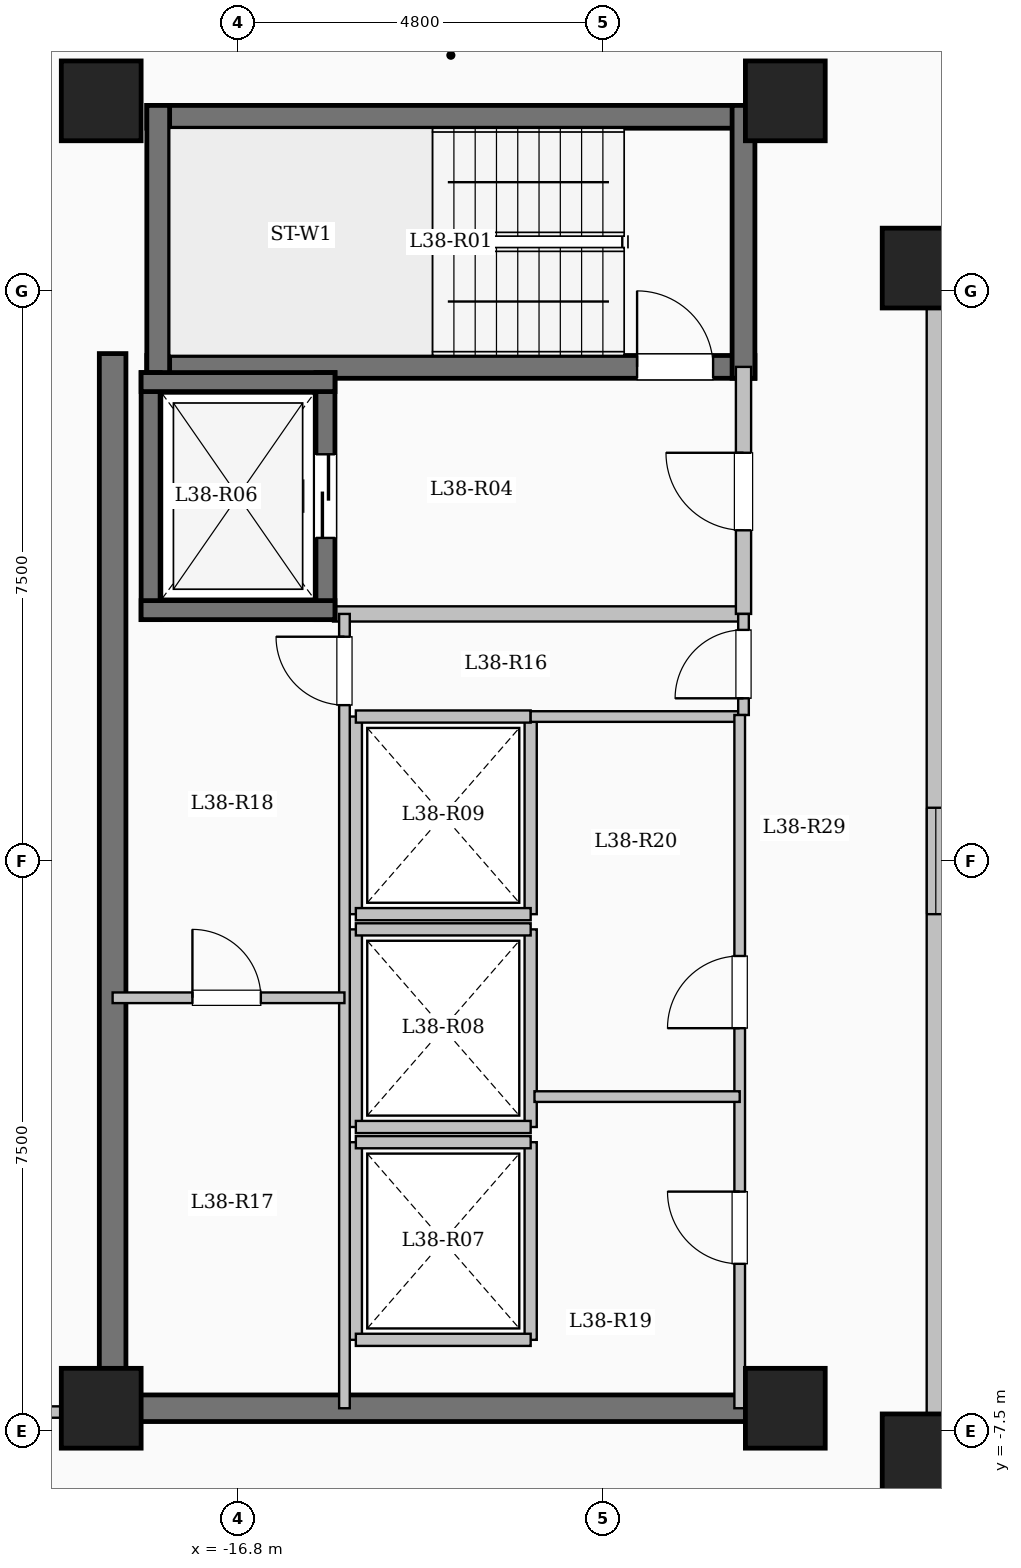
"""IFC4 building model, lengths in metres.
Left out: names, types, materials, properties, quantities, classifications, styles, units other than length and angle.
Written with IfcOpenShell. Run it as: python <this file> out.ifc"""

import sys

from ifc_helpers import new_model, si_unit, direction, frame, frame_2d, origin, origin_2d, place, context, subcontext, project, spatial, rectangle, extrude, element, fill, save


model = new_model("IFC4")
c1 = context("Model", 3, precision=1e-05, world=origin(), true_north=direction((0.0, 1.0)))
c2 = subcontext(c1, "Body", "Model", "MODEL_VIEW")
j1 = project(units=[si_unit("LENGTHUNIT", "METRE"), si_unit("PLANEANGLEUNIT", "RADIAN")], contexts=[c1])
p1 = place(None, origin())
s1 = spatial("IfcSite", under=j1, at=p1, CompositionType="ELEMENT")
p2 = place(p1, origin())
s2 = spatial("IfcBuilding", under=s1, at=p2, CompositionType="ELEMENT")
p3 = place(p2, frame((0.0, 0.0, 142.65)))
s3 = spatial("IfcBuildingStorey", under=s2, at=p3, CompositionType="ELEMENT", Elevation=142.65)
for number, where, z_axis, x_axis in (
    (1, (-7.8, -7.8, 0.0), (0.0, 0.0, 1.0), (1.0, 0.0, 0.0)),
    (2, (-7.8, 7.8, 0.0), (0.0, 0.0, 1.0), (1.0, 0.0, 0.0)),
    (3, (-9.6, -7.2, 0.0), (0.0, 0.0, 1.0), (1.0, 0.0, 0.0)),
    (4, (-9.6, 10.0, 0.0), (0.0, 0.0, 1.0), (1.0, 0.0, 0.0)),
    (5, (-18.6, -7.2, 0.0), (0.0, 0.0, 1.0), (1.0, 0.0, 0.0)),
    (6, (-18.6, 10.0, 0.0), (0.0, 0.0, 1.0), (1.0, 0.0, 0.0)),
):
    element("IfcColumn", number, at=place(p3, frame(where, z_axis=z_axis, x_axis=x_axis)), inside=s3, PredefinedType="COLUMN", context=c2, shape_type="SweptSolid", body=[
        extrude(rectangle(XDim=1.05, YDim=1.05, at=origin_2d()), origin(), (0.0, 0.0, 1.0), 3.35),
    ])
p4 = place(p3, frame((-7.62, -7.62, 0.0), z_axis=(0.0, 0.0, 1.0), x_axis=(1.0, 0.0, 0.0)))
e7 = element("IfcWall", 7, at=p4, inside=s3, PredefinedType="SOLIDWALL", context=c2, shape_type="SweptSolid", body=[
    extrude(rectangle(XDim=15.24, YDim=0.24, at=frame_2d((7.62, 0.0))), origin(), (0.0, 0.0, 1.0), 3.1),
])
p5 = place(p4, frame((6.92, 0.0, 0.95)))
e8 = element("IfcOpeningElement", 8, at=p5, cuts=e7, PredefinedType="OPENING", context=c2, shape_type="SweptSolid", body=[
    extrude(rectangle(XDim=1.4, YDim=1.5, at=frame_2d((0.7, 0.75))), frame((0.0, 0.13, 0.0), z_axis=(0.0, -1.0, 0.0), x_axis=(1.0, 0.0, 0.0)), (0.0, 0.0, 1.0), 0.26),
])
p6 = place(p3, frame((7.62, 7.62, 0.0), z_axis=(0.0, 0.0, 1.0), x_axis=(-1.0, 0.0, 0.0)))
e9 = element("IfcWall", 9, at=p6, inside=s3, PredefinedType="SOLIDWALL", context=c2, shape_type="SweptSolid", body=[
    extrude(rectangle(XDim=15.24, YDim=0.24, at=frame_2d((7.62, 0.0))), origin(), (0.0, 0.0, 1.0), 3.1),
])
p7 = place(p6, frame((6.92, 0.0, 0.95)))
e10 = element("IfcOpeningElement", 10, at=p7, cuts=e9, PredefinedType="OPENING", context=c2, shape_type="SweptSolid", body=[
    extrude(rectangle(XDim=1.4, YDim=1.5, at=frame_2d((0.7, 0.75))), frame((0.0, 0.13, 0.0), z_axis=(0.0, -1.0, 0.0), x_axis=(1.0, 0.0, 0.0)), (0.0, 0.0, 1.0), 0.26),
])
p8 = place(p3, frame((-7.62, 7.62, 0.0), z_axis=(0.0, 0.0, 1.0), x_axis=(0.0, -1.0, 0.0)))
e11 = element("IfcWall", 11, at=p8, inside=s3, PredefinedType="SOLIDWALL", context=c2, shape_type="SweptSolid", body=[
    extrude(rectangle(XDim=15.24, YDim=0.24, at=frame_2d((7.62, 0.0))), origin(), (0.0, 0.0, 1.0), 3.1),
])
p9 = place(p8, frame((6.92, 0.0, 0.95)))
e12 = element("IfcOpeningElement", 12, at=p9, cuts=e11, PredefinedType="OPENING", context=c2, shape_type="SweptSolid", body=[
    extrude(rectangle(XDim=1.4, YDim=1.5, at=frame_2d((0.7, 0.75))), frame((0.0, 0.13, 0.0), z_axis=(0.0, -1.0, 0.0), x_axis=(1.0, 0.0, 0.0)), (0.0, 0.0, 1.0), 0.26),
])
p10 = place(p3, frame((-18.0, 9.79, 0.0), z_axis=(0.0, 0.0, 1.0), x_axis=(1.0, 0.0, 0.0)))
e13 = element("IfcWall", 13, at=p10, inside=s3, PredefinedType="SHEAR", context=c2, shape_type="SweptSolid", body=[
    extrude(rectangle(XDim=8.0, YDim=0.3, at=frame_2d((4.0, 0.0))), origin(), (0.0, 0.0, 1.0), 3.35),
])
p11 = place(p3, frame((-18.0, 6.5, 0.0), z_axis=(0.0, 0.0, 1.0), x_axis=(1.0, 0.0, 0.0)))
e14 = element("IfcWall", 14, at=p11, inside=s3, PredefinedType="SHEAR", context=c2, shape_type="SweptSolid", body=[
    extrude(rectangle(XDim=8.0, YDim=0.3, at=frame_2d((4.0, 0.0))), origin(), (0.0, 0.0, 1.0), 3.35),
])
p12 = place(p11, frame((6.45, 0.0, 0.0)))
e15 = element("IfcOpeningElement", 15, at=p12, cuts=e14, PredefinedType="OPENING", context=c2, shape_type="SweptSolid", body=[
    extrude(rectangle(XDim=1.0, YDim=2.15, at=frame_2d((0.5, 1.075))), frame((0.0, 0.16, 0.0), z_axis=(0.0, -1.0, 0.0), x_axis=(1.0, 0.0, 0.0)), (0.0, 0.0, 1.0), 0.32),
])
for number, where, z_axis, x_axis in (
    (16, (-17.85, 6.35, 0.0), (0.0, 0.0, 1.0), (0.0, 1.0, 0.0)),
    (17, (-10.15, 6.35, 0.0), (0.0, 0.0, 1.0), (0.0, 1.0, 0.0)),
):
    element("IfcWall", number, at=place(p3, frame(where, z_axis=z_axis, x_axis=x_axis)), inside=s3, PredefinedType="SHEAR", context=c2, shape_type="SweptSolid", body=[
        extrude(rectangle(XDim=3.59, YDim=0.3, at=frame_2d((1.795, 0.0))), origin(), (0.0, 0.0, 1.0), 3.35),
    ])
p13 = place(p3, frame((-15.55, 3.25, 0.0), z_axis=(0.0, 0.0, 1.0), x_axis=(1.0, 0.0, 0.0)))
e18 = element("IfcWall", 18, at=p13, inside=s3, PredefinedType="SOLIDWALL", context=c2, shape_type="SweptSolid", body=[
    extrude(rectangle(XDim=5.4, YDim=0.2, at=frame_2d((2.7, 0.0))), origin(), (0.0, 0.0, 1.0), 3.1),
])
p14 = place(p3, frame((-10.15, 3.25, 0.0), z_axis=(0.0, 0.0, 1.0), x_axis=(0.0, 1.0, 0.0)))
e19 = element("IfcWall", 19, at=p14, inside=s3, PredefinedType="SOLIDWALL", context=c2, shape_type="SweptSolid", body=[
    extrude(rectangle(XDim=3.25, YDim=0.2, at=frame_2d((1.625, 0.0))), origin(), (0.0, 0.0, 1.0), 3.1),
])
p15 = place(p14, frame((1.1, 0.0, 0.0)))
e20 = element("IfcOpeningElement", 20, at=p15, cuts=e19, PredefinedType="OPENING", context=c2, shape_type="SweptSolid", body=[
    extrude(rectangle(XDim=1.02, YDim=2.15, at=frame_2d((0.51, 1.075))), frame((0.0, 0.11, 0.0), z_axis=(0.0, -1.0, 0.0), x_axis=(1.0, 0.0, 0.0)), (0.0, 0.0, 1.0), 0.22),
])
p16 = place(p3, frame((-17.95, 3.175, 0.0), z_axis=(0.0, 0.0, 1.0), x_axis=(0.0, 1.0, 0.0)))
e21 = element("IfcWall", 21, at=p16, inside=s3, PredefinedType="SHEAR", context=c2, shape_type="SweptSolid", body=[
    extrude(rectangle(XDim=3.25, YDim=0.25, at=frame_2d((1.625, 0.0))), origin(), (0.0, 0.0, 1.0), 3.35),
])
p17 = place(p3, frame((-15.65, 3.175, 0.0), z_axis=(0.0, 0.0, 1.0), x_axis=(0.0, 1.0, 0.0)))
e22 = element("IfcWall", 22, at=p17, inside=s3, PredefinedType="SHEAR", context=c2, shape_type="SweptSolid", body=[
    extrude(rectangle(XDim=3.25, YDim=0.25, at=frame_2d((1.625, 0.0))), origin(), (0.0, 0.0, 1.0), 3.35),
])
p18 = place(p17, frame((1.075, 0.0, 0.0)))
e23 = element("IfcOpeningElement", 23, at=p18, cuts=e22, PredefinedType="OPENING", context=c2, shape_type="SweptSolid", body=[
    extrude(rectangle(XDim=1.1, YDim=2.15, at=frame_2d((0.55, 1.075))), frame((0.0, 0.135, 0.0), z_axis=(0.0, -1.0, 0.0), x_axis=(1.0, 0.0, 0.0)), (0.0, 0.0, 1.0), 0.27),
])
for number, where, z_axis, x_axis in (
    (24, (-18.075, 3.3, 0.0), (0.0, 0.0, 1.0), (1.0, 0.0, 0.0)),
    (25, (-18.075, 6.3, 0.0), (0.0, 0.0, 1.0), (1.0, 0.0, 0.0)),
):
    element("IfcWall", number, at=place(p3, frame(where, z_axis=z_axis, x_axis=x_axis)), inside=s3, PredefinedType="SHEAR", context=c2, shape_type="SweptSolid", body=[
        extrude(rectangle(XDim=2.55, YDim=0.25, at=frame_2d((1.275, 0.0))), origin(), (0.0, 0.0, 1.0), 3.35),
    ])
for number, where, z_axis, x_axis in (
    (26, (-15.25, -6.3, 0.0), (0.0, 0.0, 1.0), (0.0, 1.0, 0.0)),
    (27, (-12.95, -6.3, 0.0), (0.0, 0.0, 1.0), (0.0, 1.0, 0.0)),
):
    element("IfcWall", number, at=place(p3, frame(where, z_axis=z_axis, x_axis=x_axis)), inside=s3, PredefinedType="SOLIDWALL", context=c2, shape_type="SweptSolid", body=[
        extrude(rectangle(XDim=2.6, YDim=0.16, at=frame_2d((1.3, 0.0))), origin(), (0.0, 0.0, 1.0), 3.1),
    ])
for number, where, z_axis, x_axis in (
    (28, (-15.25, -6.3, 0.0), (0.0, 0.0, 1.0), (1.0, 0.0, 0.0)),
    (29, (-15.25, -3.7, 0.0), (0.0, 0.0, 1.0), (1.0, 0.0, 0.0)),
):
    element("IfcWall", number, at=place(p3, frame(where, z_axis=z_axis, x_axis=x_axis)), inside=s3, PredefinedType="SOLIDWALL", context=c2, shape_type="SweptSolid", body=[
        extrude(rectangle(XDim=2.3, YDim=0.16, at=frame_2d((1.15, 0.0))), origin(), (0.0, 0.0, 1.0), 3.1),
    ])
for number, where, z_axis, x_axis in (
    (30, (-15.25, -3.5, 0.0), (0.0, 0.0, 1.0), (0.0, 1.0, 0.0)),
    (31, (-12.95, -3.5, 0.0), (0.0, 0.0, 1.0), (0.0, 1.0, 0.0)),
):
    element("IfcWall", number, at=place(p3, frame(where, z_axis=z_axis, x_axis=x_axis)), inside=s3, PredefinedType="SOLIDWALL", context=c2, shape_type="SweptSolid", body=[
        extrude(rectangle(XDim=2.6, YDim=0.16, at=frame_2d((1.3, 0.0))), origin(), (0.0, 0.0, 1.0), 3.1),
    ])
for number, where, z_axis, x_axis in (
    (32, (-15.25, -3.5, 0.0), (0.0, 0.0, 1.0), (1.0, 0.0, 0.0)),
    (33, (-15.25, -0.9, 0.0), (0.0, 0.0, 1.0), (1.0, 0.0, 0.0)),
):
    element("IfcWall", number, at=place(p3, frame(where, z_axis=z_axis, x_axis=x_axis)), inside=s3, PredefinedType="SOLIDWALL", context=c2, shape_type="SweptSolid", body=[
        extrude(rectangle(XDim=2.3, YDim=0.16, at=frame_2d((1.15, 0.0))), origin(), (0.0, 0.0, 1.0), 3.1),
    ])
for number, where, z_axis, x_axis in (
    (34, (-15.25, -0.7, 0.0), (0.0, 0.0, 1.0), (0.0, 1.0, 0.0)),
    (35, (-12.95, -0.7, 0.0), (0.0, 0.0, 1.0), (0.0, 1.0, 0.0)),
):
    element("IfcWall", number, at=place(p3, frame(where, z_axis=z_axis, x_axis=x_axis)), inside=s3, PredefinedType="SOLIDWALL", context=c2, shape_type="SweptSolid", body=[
        extrude(rectangle(XDim=2.6, YDim=0.16, at=frame_2d((1.3, 0.0))), origin(), (0.0, 0.0, 1.0), 3.1),
    ])
for number, where, z_axis, x_axis in (
    (36, (-15.25, -0.7, 0.0), (0.0, 0.0, 1.0), (1.0, 0.0, 0.0)),
    (37, (-15.25, 1.9, 0.0), (0.0, 0.0, 1.0), (1.0, 0.0, 0.0)),
):
    element("IfcWall", number, at=place(p3, frame(where, z_axis=z_axis, x_axis=x_axis)), inside=s3, PredefinedType="SOLIDWALL", context=c2, shape_type="SweptSolid", body=[
        extrude(rectangle(XDim=2.3, YDim=0.16, at=frame_2d((1.15, 0.0))), origin(), (0.0, 0.0, 1.0), 3.1),
    ])
p19 = place(p3, frame((-18.45, -7.375, 0.0), z_axis=(0.0, 0.0, 1.0), x_axis=(0.0, 1.0, 0.0)))
e38 = element("IfcWall", 38, at=p19, inside=s3, PredefinedType="SHEAR", context=c2, shape_type="SweptSolid", body=[
    extrude(rectangle(XDim=14.05, YDim=0.35, at=frame_2d((7.025, 0.0))), origin(), (0.0, 0.0, 1.0), 3.35),
])
p20 = place(p3, frame((-18.625, -7.2, 0.0), z_axis=(0.0, 0.0, 1.0), x_axis=(1.0, 0.0, 0.0)))
e39 = element("IfcWall", 39, at=p20, inside=s3, PredefinedType="SHEAR", context=c2, shape_type="SweptSolid", body=[
    extrude(rectangle(XDim=8.55, YDim=0.35, at=frame_2d((4.275, 0.0))), origin(), (0.0, 0.0, 1.0), 3.35),
])
p21 = place(p3, frame((-12.95, 1.9, 0.0), z_axis=(0.0, 0.0, 1.0), x_axis=(1.0, 0.0, 0.0)))
e40 = element("IfcWall", 40, at=p21, inside=s3, PredefinedType="PARTITIONING", context=c2, shape_type="SweptSolid", body=[
    extrude(rectangle(XDim=2.8, YDim=0.14, at=frame_2d((1.4, 0.0))), origin(), (0.0, 0.0, 1.0), 3.1),
])
p22 = place(p3, frame((-10.15, 1.92, 0.0), z_axis=(0.0, 0.0, 1.0), x_axis=(0.0, 1.0, 0.0)))
e41 = element("IfcWall", 41, at=p22, inside=s3, PredefinedType="PARTITIONING", context=c2, shape_type="SweptSolid", body=[
    extrude(rectangle(XDim=1.33, YDim=0.14, at=frame_2d((0.665, 0.0))), origin(), (0.0, 0.0, 1.0), 3.1),
])
p23 = place(p22, frame((0.22, 0.0, 0.0)))
e42 = element("IfcOpeningElement", 42, at=p23, cuts=e41, PredefinedType="OPENING", context=c2, shape_type="SweptSolid", body=[
    extrude(rectangle(XDim=0.9, YDim=2.08, at=frame_2d((0.45, 1.04))), frame((0.0, 0.08, 0.0), z_axis=(0.0, -1.0, 0.0), x_axis=(1.0, 0.0, 0.0)), (0.0, 0.0, 1.0), 0.16),
])
p24 = place(p3, frame((-15.4, -7.2, 0.0), z_axis=(0.0, 0.0, 1.0), x_axis=(0.0, 1.0, 0.0)))
e43 = element("IfcWall", 43, at=p24, inside=s3, PredefinedType="PARTITIONING", context=c2, shape_type="SweptSolid", body=[
    extrude(rectangle(XDim=10.45, YDim=0.14, at=frame_2d((5.225, 0.0))), origin(), (0.0, 0.0, 1.0), 3.1),
])
p25 = place(p24, frame((9.25, 0.0, 0.0)))
e44 = element("IfcOpeningElement", 44, at=p25, cuts=e43, PredefinedType="OPENING", context=c2, shape_type="SweptSolid", body=[
    extrude(rectangle(XDim=0.9, YDim=2.08, at=frame_2d((0.45, 1.04))), frame((0.0, 0.08, 0.0), z_axis=(0.0, -1.0, 0.0), x_axis=(1.0, 0.0, 0.0)), (0.0, 0.0, 1.0), 0.16),
])
p26 = place(p3, frame((-18.45, -1.8, 0.0), z_axis=(0.0, 0.0, 1.0), x_axis=(1.0, 0.0, 0.0)))
e45 = element("IfcWall", 45, at=p26, inside=s3, PredefinedType="PARTITIONING", context=c2, shape_type="SweptSolid", body=[
    extrude(rectangle(XDim=3.05, YDim=0.14, at=frame_2d((1.525, 0.0))), origin(), (0.0, 0.0, 1.0), 3.1),
])
p27 = place(p26, frame((1.05, 0.0, 0.0)))
e46 = element("IfcOpeningElement", 46, at=p27, cuts=e45, PredefinedType="OPENING", context=c2, shape_type="SweptSolid", body=[
    extrude(rectangle(XDim=0.9, YDim=2.08, at=frame_2d((0.45, 1.04))), frame((0.0, 0.08, 0.0), z_axis=(0.0, -1.0, 0.0), x_axis=(1.0, 0.0, 0.0)), (0.0, 0.0, 1.0), 0.16),
])
p28 = place(p3, frame((-10.2, -7.2, 0.0), z_axis=(0.0, 0.0, 1.0), x_axis=(0.0, 1.0, 0.0)))
e47 = element("IfcWall", 47, at=p28, inside=s3, PredefinedType="PARTITIONING", context=c2, shape_type="SweptSolid", body=[
    extrude(rectangle(XDim=9.12, YDim=0.14, at=frame_2d((4.56, 0.0))), origin(), (0.0, 0.0, 1.0), 3.1),
])
p29 = place(p28, frame((1.9, 0.0, 0.0)))
e48 = element("IfcOpeningElement", 48, at=p29, cuts=e47, PredefinedType="OPENING", context=c2, shape_type="SweptSolid", body=[
    extrude(rectangle(XDim=0.95, YDim=2.12, at=frame_2d((0.475, 1.06))), frame((0.0, 0.08, 0.0), z_axis=(0.0, -1.0, 0.0), x_axis=(1.0, 0.0, 0.0)), (0.0, 0.0, 1.0), 0.16),
])
p30 = place(p28, frame((5.0, 0.0, 0.0)))
e49 = element("IfcOpeningElement", 49, at=p30, cuts=e47, PredefinedType="OPENING", context=c2, shape_type="SweptSolid", body=[
    extrude(rectangle(XDim=0.95, YDim=2.12, at=frame_2d((0.475, 1.06))), frame((0.0, 0.08, 0.0), z_axis=(0.0, -1.0, 0.0), x_axis=(1.0, 0.0, 0.0)), (0.0, 0.0, 1.0), 0.16),
])
p31 = place(p3, frame((-12.9, -3.1, 0.0), z_axis=(0.0, 0.0, 1.0), x_axis=(1.0, 0.0, 0.0)))
e50 = element("IfcWall", 50, at=p31, inside=s3, PredefinedType="PARTITIONING", context=c2, shape_type="SweptSolid", body=[
    extrude(rectangle(XDim=2.7, YDim=0.14, at=frame_2d((1.35, 0.0))), origin(), (0.0, 0.0, 1.0), 3.1),
])
p32 = place(p3, frame((-25.08, -7.25, 0.0), z_axis=(0.0, 0.0, 1.0), x_axis=(1.0, 0.0, 0.0)))
e51 = element("IfcWall", 51, at=p32, inside=s3, PredefinedType="PARTITIONING", context=c2, shape_type="SweptSolid", body=[
    extrude(rectangle(XDim=6.63, YDim=0.15, at=frame_2d((3.315, 0.0))), origin(), (0.0, 0.0, 1.0), 3.1),
])
p33 = place(p32, frame((3.58, 0.0, 0.0)))
e52 = element("IfcOpeningElement", 52, at=p33, cuts=e51, PredefinedType="OPENING", context=c2, shape_type="SweptSolid", body=[
    extrude(rectangle(XDim=1.08, YDim=2.15, at=frame_2d((0.54, 1.075))), frame((0.0, 0.085, 0.0), z_axis=(0.0, -1.0, 0.0), x_axis=(1.0, 0.0, 0.0)), (0.0, 0.0, 1.0), 0.17),
])
p34 = place(p9, origin())
e53 = element("IfcWindow", 53, at=p34, inside=s3, PartitioningType="SINGLE_PANEL", PredefinedType="WINDOW", context=c2, shape_type="SweptSolid", body=[
    extrude(rectangle(XDim=1.4, YDim=1.5, at=frame_2d((0.7, 0.75))), frame((0.0, 0.03, 0.0), z_axis=(0.0, -1.0, 0.0), x_axis=(1.0, 0.0, 0.0)), (0.0, 0.0, 1.0), 0.06),
])
fill(e12, e53)
p35 = place(p12, origin())
e54 = element("IfcDoor", 54, at=p35, inside=s3, OperationType="SINGLE_SWING_LEFT", PredefinedType="DOOR", context=c2, shape_type="SweptSolid", body=[
    extrude(rectangle(XDim=1.0, YDim=2.15, at=frame_2d((0.5, 1.075))), frame((0.0, 0.025, 0.0), z_axis=(0.0, -1.0, 0.0), x_axis=(1.0, 0.0, 0.0)), (0.0, 0.0, 1.0), 0.05),
])
fill(e15, e54)
p36 = place(p15, origin())
e55 = element("IfcDoor", 55, at=p36, inside=s3, OperationType="SINGLE_SWING_RIGHT", PredefinedType="DOOR", context=c2, shape_type="SweptSolid", body=[
    extrude(rectangle(XDim=1.02, YDim=2.15, at=frame_2d((0.51, 1.075))), frame((0.0, 0.025, 0.0), z_axis=(0.0, -1.0, 0.0), x_axis=(1.0, 0.0, 0.0)), (0.0, 0.0, 1.0), 0.05),
])
fill(e20, e55)
p37 = place(p18, origin())
e56 = element("IfcDoor", 56, at=p37, inside=s3, OperationType="SLIDING_TO_LEFT", PredefinedType="DOOR", context=c2, shape_type="SweptSolid", body=[
    extrude(rectangle(XDim=1.1, YDim=2.15, at=frame_2d((0.55, 1.075))), frame((0.0, 0.025, 0.0), z_axis=(0.0, -1.0, 0.0), x_axis=(1.0, 0.0, 0.0)), (0.0, 0.0, 1.0), 0.05),
])
fill(e23, e56)
p38 = place(p23, origin())
e57 = element("IfcDoor", 57, at=p38, inside=s3, OperationType="SINGLE_SWING_LEFT", PredefinedType="DOOR", context=c2, shape_type="SweptSolid", body=[
    extrude(rectangle(XDim=0.9, YDim=2.08, at=frame_2d((0.45, 1.04))), frame((0.0, 0.025, 0.0), z_axis=(0.0, -1.0, 0.0), x_axis=(1.0, 0.0, 0.0)), (0.0, 0.0, 1.0), 0.05),
])
fill(e42, e57)
p39 = place(p25, origin())
e58 = element("IfcDoor", 58, at=p39, inside=s3, OperationType="SINGLE_SWING_RIGHT", PredefinedType="DOOR", context=c2, shape_type="SweptSolid", body=[
    extrude(rectangle(XDim=0.9, YDim=2.08, at=frame_2d((0.45, 1.04))), frame((0.0, 0.025, 0.0), z_axis=(0.0, -1.0, 0.0), x_axis=(1.0, 0.0, 0.0)), (0.0, 0.0, 1.0), 0.05),
])
fill(e44, e58)
p40 = place(p27, origin())
e59 = element("IfcDoor", 59, at=p40, inside=s3, OperationType="SINGLE_SWING_LEFT", PredefinedType="DOOR", context=c2, shape_type="SweptSolid", body=[
    extrude(rectangle(XDim=0.9, YDim=2.08, at=frame_2d((0.45, 1.04))), frame((0.0, 0.025, 0.0), z_axis=(0.0, -1.0, 0.0), x_axis=(1.0, 0.0, 0.0)), (0.0, 0.0, 1.0), 0.05),
])
fill(e46, e59)
p41 = place(p29, origin())
e60 = element("IfcDoor", 60, at=p41, inside=s3, OperationType="SINGLE_SWING_RIGHT", PredefinedType="DOOR", context=c2, shape_type="SweptSolid", body=[
    extrude(rectangle(XDim=0.95, YDim=2.12, at=frame_2d((0.475, 1.06))), frame((0.0, 0.025, 0.0), z_axis=(0.0, -1.0, 0.0), x_axis=(1.0, 0.0, 0.0)), (0.0, 0.0, 1.0), 0.05),
])
fill(e48, e60)
p42 = place(p30, origin())
e61 = element("IfcDoor", 61, at=p42, inside=s3, OperationType="SINGLE_SWING_LEFT", PredefinedType="DOOR", context=c2, shape_type="SweptSolid", body=[
    extrude(rectangle(XDim=0.95, YDim=2.12, at=frame_2d((0.475, 1.06))), frame((0.0, 0.025, 0.0), z_axis=(0.0, -1.0, 0.0), x_axis=(1.0, 0.0, 0.0)), (0.0, 0.0, 1.0), 0.05),
])
fill(e49, e61)
save(model, sys.argv[1])
